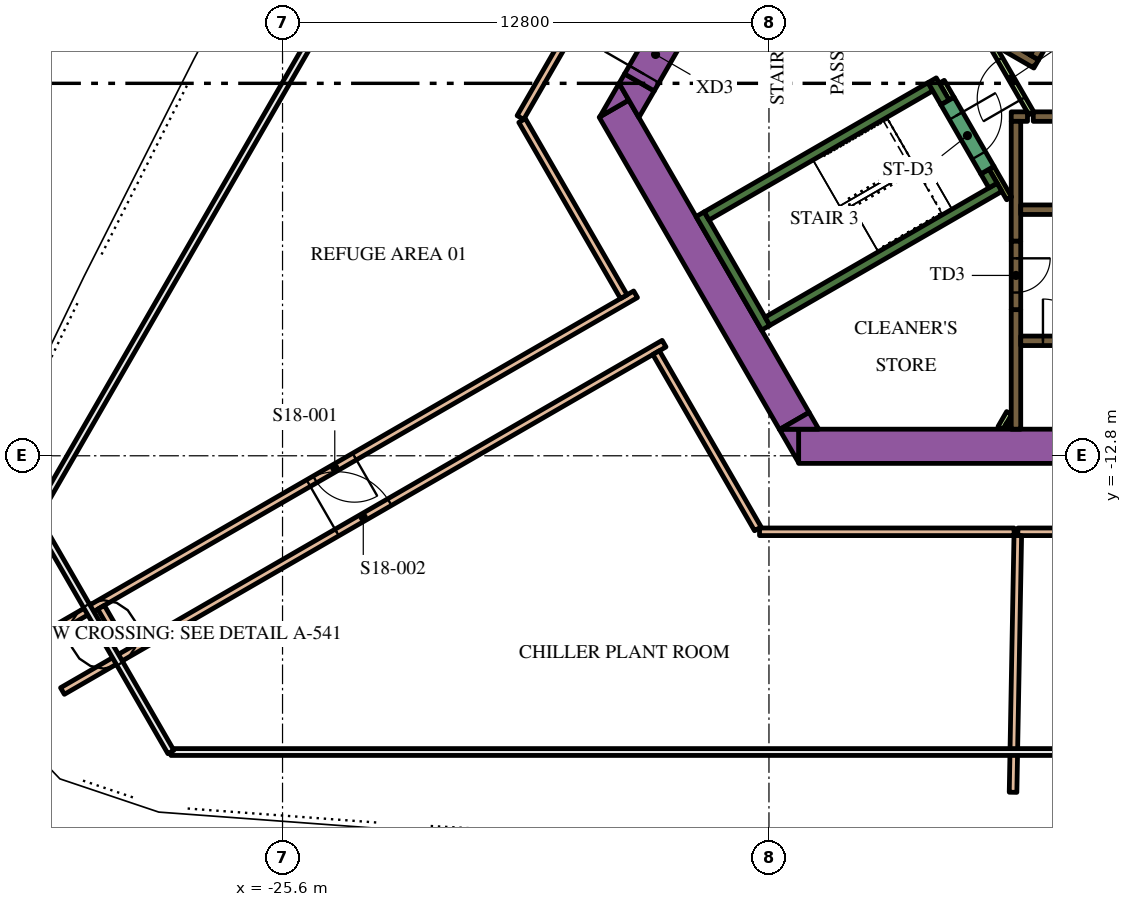
"""IFC4 building model, lengths in metres.
Left out: names, types, materials, properties, quantities, classifications, styles, units other than length and angle.
Written with IfcOpenShell. Run it as: python <this file> out.ifc"""

import sys

from ifc_helpers import new_model, si_unit, direction, frame, frame_2d, origin, place, context, subcontext, project, spatial, polyline, rectangle, outline, extrude, element, fill, save


model = new_model("IFC4")
c1 = context("Model", 3, precision=1e-05, world=origin(), true_north=direction((0.0, 1.0)))
c2 = subcontext(c1, "Body", "Model", "MODEL_VIEW")
j1 = project(units=[si_unit("LENGTHUNIT", "METRE"), si_unit("PLANEANGLEUNIT", "RADIAN")], contexts=[c1])
p1 = place(None, origin())
s1 = spatial("IfcSite", under=j1, at=p1, CompositionType="ELEMENT")
p2 = place(p1, origin())
s2 = spatial("IfcBuilding", under=s1, at=p2, CompositionType="ELEMENT")
p3 = place(p2, frame((0.0, 0.0, 78.3)))
s3 = spatial("IfcBuildingStorey", under=s2, at=p3, CompositionType="ELEMENT", Elevation=78.3)
p4 = place(p3, frame((-12.019, -12.55, 0.0), z_axis=(0.0, 0.0, 1.0), x_axis=(1.0, 0.0, 0.0)))
e1 = element("IfcWall", 1, at=p4, inside=s3, PredefinedType="SOLIDWALL", context=c2, shape_type="SweptSolid", body=[
    extrude(rectangle(XDim=21.63, YDim=0.9, at=frame_2d((10.815, 0.0))), origin(), (0.0, 0.0, 1.0), 5.4),
])
p5 = place(p3, origin())
e2 = element("IfcWall", 2, at=p5, inside=s3, PredefinedType="SOLIDWALL", context=c2, shape_type="SweptSolid", body=[
    extrude(outline(polyline([(-12.529, -12.1), (-12.021, -12.1), (-12.021, -12.98), (-12.529, -12.1)])), origin(), (0.0, 0.0, 1.0), 5.4),
])
p6 = place(p3, frame((-12.134, -11.883, 0.0), z_axis=(0.0, 0.0, 1.0), x_axis=(-0.500005339912, 0.866022320763, 0.0)))
e3 = element("IfcWall", 3, at=p6, inside=s3, PredefinedType="SOLIDWALL", context=c2, shape_type="SweptSolid", body=[
    extrude(rectangle(XDim=9.488, YDim=0.9, at=frame_2d((4.744, 0.0))), origin(), (0.0, 0.0, 1.0), 5.4),
])
e4 = element("IfcWall", 4, at=p5, inside=s3, PredefinedType="SOLIDWALL", context=c2, shape_type="SweptSolid", body=[
    extrude(outline(polyline([(-16.489, -3.44), (-17.251, -3.88), (-16.743, -3.0), (-16.489, -3.44)])), origin(), (0.0, 0.0, 1.0), 5.4),
])
e5 = element("IfcWall", 5, at=p5, inside=s3, PredefinedType="SOLIDWALL", context=c2, shape_type="SweptSolid", body=[
    extrude(outline(polyline([(-11.489, -12.1), (-12.505, -12.1), (-11.743, -11.66), (-11.489, -12.1)])), origin(), (0.0, 0.0, 1.0), 5.4),
])
e6 = element("IfcWall", 6, at=p5, inside=s3, PredefinedType="SOLIDWALL", context=c2, shape_type="SweptSolid", body=[
    extrude(outline(polyline([(-15.82, -3.201), (-16.223, -3.9), (-16.743, -3.0), (-16.599, -2.751), (-15.82, -3.201)])), origin(), (0.0, 0.0, 1.0), 5.4),
])
p7 = place(p3, frame((-12.885, -9.431, 0.0), z_axis=(0.0, 0.0, 1.0), x_axis=(-0.500020560727, 0.866013532718, 0.0)))
e7 = element("IfcWall", 7, at=p7, inside=s3, PredefinedType="SOLIDWALL", context=c2, shape_type="SweptSolid", body=[
    extrude(rectangle(XDim=3.45, YDim=0.25, at=frame_2d((1.725, 0.0))), origin(), (0.0, 0.0, 1.0), 5.4),
])
p8 = place(p3, frame((-14.44, -6.49, 0.0), z_axis=(0.0, 0.0, 1.0), x_axis=(0.866022966069, 0.500004222222, 0.0)))
e8 = element("IfcWall", 8, at=p8, inside=s3, PredefinedType="SOLIDWALL", context=c2, shape_type="SweptSolid", body=[
    extrude(rectangle(XDim=6.8, YDim=0.25, at=frame_2d((3.4, 0.0))), origin(), (0.0, 0.0, 1.0), 5.4),
])
p9 = place(p3, frame((-8.168, -3.503, 0.0), z_axis=(0.0, 0.0, 1.0), x_axis=(-0.499952099219, 0.866053057547, 0.0)))
e9 = element("IfcWall", 9, at=p9, inside=s3, PredefinedType="SOLIDWALL", context=c2, shape_type="SweptSolid", body=[
    extrude(rectangle(XDim=0.675, YDim=0.25, at=frame_2d((0.337, 0.0))), origin(), (0.0, 0.0, 1.0), 5.4),
])
p10 = place(p3, frame((-12.84, -9.261, 0.0), z_axis=(0.0, 0.0, 1.0), x_axis=(0.866016039709, 0.500016218704, 0.0)))
e10 = element("IfcWall", 10, at=p10, inside=s3, PredefinedType="SOLIDWALL", context=c2, shape_type="SweptSolid", body=[
    extrude(rectangle(XDim=7.05, YDim=0.25, at=frame_2d((3.525, 0.0))), origin(), (0.0, 0.0, 1.0), 5.4),
])
p11 = place(p3, frame((-6.905, -5.69, 0.0), z_axis=(0.0, 0.0, 1.0), x_axis=(-0.500402024738, 0.865793170242, 0.0)))
e11 = element("IfcWall", 11, at=p11, inside=s3, PredefinedType="SOLIDWALL", context=c2, shape_type="SweptSolid", body=[
    extrude(rectangle(XDim=0.425, YDim=0.25, at=frame_2d((0.212, 0.0))), origin(), (0.0, 0.0, 1.0), 5.4),
])
p12 = place(p3, frame((-6.3, -12.1, 0.0), z_axis=(0.0, 0.0, 1.0), x_axis=(0.0, 1.0, 0.0)))
e12 = element("IfcWall", 12, at=p12, inside=s3, PredefinedType="SOLIDWALL", context=c2, shape_type="SweptSolid", body=[
    extrude(rectangle(XDim=3.146, YDim=0.25, at=frame_2d((1.573, 0.0))), origin(), (0.0, 0.0, 1.0), 5.4),
])
p13 = place(p3, frame((-5.845, -3.875, 0.0), z_axis=(0.0, 0.0, 1.0), x_axis=(1.0, 0.0, 0.0)))
e13 = element("IfcWall", 13, at=p13, inside=s3, PredefinedType="SOLIDWALL", context=c2, shape_type="SweptSolid", body=[
    extrude(rectangle(XDim=12.27, YDim=0.25, at=frame_2d((6.135, 0.0))), origin(), (0.0, 0.0, 1.0), 5.4),
])
p14 = place(p3, frame((-6.425, -3.875, 0.0), z_axis=(0.0, 0.0, 1.0), x_axis=(1.0, 0.0, 0.0)))
e14 = element("IfcWall", 14, at=p14, inside=s3, PredefinedType="SOLIDWALL", context=c2, shape_type="SweptSolid", body=[
    extrude(rectangle(XDim=0.428, YDim=0.25, at=frame_2d((0.214, 0.0))), origin(), (0.0, 0.0, 1.0), 5.4),
])
p15 = place(p3, frame((-6.3, -4.0, 0.0), z_axis=(0.0, 0.0, 1.0), x_axis=(0.0, -1.0, 0.0)))
e15 = element("IfcWall", 15, at=p15, inside=s3, PredefinedType="SOLIDWALL", context=c2, shape_type="SweptSolid", body=[
    extrude(rectangle(XDim=3.154, YDim=0.25, at=frame_2d((1.577, 0.0))), origin(), (0.0, 0.0, 1.0), 5.4),
])
e16 = element("IfcWall", 16, at=p5, inside=s3, PredefinedType="SOLIDWALL", context=c2, shape_type="SweptSolid", body=[
    extrude(outline(polyline([(-5.922, -2.257), (-5.922, -2.257), (-5.705, -2.382), (-5.83, -2.598), (-6.829, -2.021), (-6.88, -1.934), (-6.88, -1.934), (-6.93, -1.963), (-7.952, -1.373), (-7.827, -1.156), (-5.922, -2.257)])), origin(), (0.0, 0.0, 1.0), 5.4),
])
p16 = place(p3, frame((-6.708, -12.068, 0.0), z_axis=(0.0, 0.0, 1.0), x_axis=(0.500000789788, 0.8660249478, 0.0)))
e17 = element("IfcWall", 17, at=p16, inside=s3, PredefinedType="PARTITIONING", context=c2, shape_type="SweptSolid", body=[
    extrude(rectangle(XDim=0.456, YDim=0.15, at=frame_2d((0.228, 0.0))), origin(), (0.0, 0.0, 1.0), 4.25),
])
p17 = place(p3, frame((-6.534, -12.068, 0.0), z_axis=(0.0, 0.0, 1.0), x_axis=(0.500240224089, 0.865886665912, 0.0)))
e18 = element("IfcWall", 18, at=p17, inside=s3, PredefinedType="PARTITIONING", context=c2, shape_type="SweptSolid", body=[
    extrude(rectangle(XDim=0.109, YDim=0.15, at=frame_2d((0.054, 0.0))), origin(), (0.0, 0.0, 1.0), 4.25),
])
p18 = place(p3, frame((-6.48, -6.027, 0.0), z_axis=(0.0, 0.0, 1.0), x_axis=(-0.499927229454, 0.866067413802, 0.0)))
e19 = element("IfcWall", 19, at=p18, inside=s3, PredefinedType="PARTITIONING", context=c2, shape_type="SweptSolid", body=[
    extrude(rectangle(XDim=0.929, YDim=0.15, at=frame_2d((0.464, 0.0))), origin(), (0.0, 0.0, 1.0), 5.4),
])
p19 = place(p3, frame((-8.252, -2.958, 0.0), z_axis=(0.0, 0.0, 1.0), x_axis=(0.500174715838, -0.865924508047, 0.0)))
e20 = element("IfcWall", 20, at=p19, inside=s3, PredefinedType="PARTITIONING", context=c2, shape_type="SweptSolid", body=[
    extrude(rectangle(XDim=0.514, YDim=0.15, at=frame_2d((0.257, 0.0))), origin(), (0.0, 0.0, 1.0), 4.25),
])
p20 = place(p3, frame((-6.175, -9.775, 0.0), z_axis=(0.0, 0.0, 1.0), x_axis=(1.0, 0.0, 0.0)))
e21 = element("IfcWall", 21, at=p20, inside=s3, PredefinedType="SOLIDWALL", context=c2, shape_type="SweptSolid", body=[
    extrude(rectangle(XDim=12.35, YDim=0.25, at=frame_2d((6.175, 0.0))), origin(), (0.0, 0.0, 1.0), 5.4),
])
p21 = place(p20, frame((0.585, 0.0, 0.0)))
e22 = element("IfcOpeningElement", 22, at=p21, cuts=e21, PredefinedType="OPENING", context=c2, shape_type="SweptSolid", body=[
    extrude(rectangle(XDim=1.1, YDim=2.1, at=frame_2d((0.55, 1.05))), frame((0.0, 0.135, 0.0), z_axis=(0.0, -1.0, 0.0), x_axis=(1.0, 0.0, 0.0)), (0.0, 0.0, 1.0), 0.27),
])
p22 = place(p20, frame((3.105, 0.0, 0.0)))
e23 = element("IfcOpeningElement", 23, at=p22, cuts=e21, PredefinedType="OPENING", context=c2, shape_type="SweptSolid", body=[
    extrude(rectangle(XDim=1.1, YDim=2.1, at=frame_2d((0.55, 1.05))), frame((0.0, 0.135, 0.0), z_axis=(0.0, -1.0, 0.0), x_axis=(1.0, 0.0, 0.0)), (0.0, 0.0, 1.0), 0.27),
])
p23 = place(p20, frame((5.625, 0.0, 0.0)))
e24 = element("IfcOpeningElement", 24, at=p23, cuts=e21, PredefinedType="OPENING", context=c2, shape_type="SweptSolid", body=[
    extrude(rectangle(XDim=1.1, YDim=2.1, at=frame_2d((0.55, 1.05))), frame((0.0, 0.135, 0.0), z_axis=(0.0, -1.0, 0.0), x_axis=(1.0, 0.0, 0.0)), (0.0, 0.0, 1.0), 0.27),
])
p24 = place(p20, frame((8.145, 0.0, 0.0)))
e25 = element("IfcOpeningElement", 25, at=p24, cuts=e21, PredefinedType="OPENING", context=c2, shape_type="SweptSolid", body=[
    extrude(rectangle(XDim=1.1, YDim=2.1, at=frame_2d((0.55, 1.05))), frame((0.0, 0.135, 0.0), z_axis=(0.0, -1.0, 0.0), x_axis=(1.0, 0.0, 0.0)), (0.0, 0.0, 1.0), 0.27),
])
p25 = place(p20, frame((10.665, 0.0, 0.0)))
e26 = element("IfcOpeningElement", 26, at=p25, cuts=e21, PredefinedType="OPENING", context=c2, shape_type="SweptSolid", body=[
    extrude(rectangle(XDim=1.1, YDim=2.1, at=frame_2d((0.55, 1.05))), frame((0.0, 0.135, 0.0), z_axis=(0.0, -1.0, 0.0), x_axis=(1.0, 0.0, 0.0)), (0.0, 0.0, 1.0), 0.27),
])
p26 = place(p3, frame((-6.175, -6.325, 0.0), z_axis=(0.0, 0.0, 1.0), x_axis=(1.0, 0.0, 0.0)))
e27 = element("IfcWall", 27, at=p26, inside=s3, PredefinedType="SOLIDWALL", context=c2, shape_type="SweptSolid", body=[
    extrude(rectangle(XDim=12.35, YDim=0.25, at=frame_2d((6.175, 0.0))), origin(), (0.0, 0.0, 1.0), 5.4),
])
p27 = place(p26, frame((3.205, 0.0, 0.0)))
e28 = element("IfcOpeningElement", 28, at=p27, cuts=e27, PredefinedType="OPENING", context=c2, shape_type="SweptSolid", body=[
    extrude(rectangle(XDim=0.9, YDim=2.1, at=frame_2d((0.45, 1.05))), frame((0.0, 0.135, 0.0), z_axis=(0.0, -1.0, 0.0), x_axis=(1.0, 0.0, 0.0)), (0.0, 0.0, 1.0), 0.27),
])
p28 = place(p26, frame((8.145, 0.0, 0.0)))
e29 = element("IfcOpeningElement", 29, at=p28, cuts=e27, PredefinedType="OPENING", context=c2, shape_type="SweptSolid", body=[
    extrude(rectangle(XDim=1.1, YDim=2.1, at=frame_2d((0.55, 1.05))), frame((0.0, 0.135, 0.0), z_axis=(0.0, -1.0, 0.0), x_axis=(1.0, 0.0, 0.0)), (0.0, 0.0, 1.0), 0.27),
])
p29 = place(p26, frame((10.665, 0.0, 0.0)))
e30 = element("IfcOpeningElement", 30, at=p29, cuts=e27, PredefinedType="OPENING", context=c2, shape_type="SweptSolid", body=[
    extrude(rectangle(XDim=1.1, YDim=2.1, at=frame_2d((0.55, 1.05))), frame((0.0, 0.135, 0.0), z_axis=(0.0, -1.0, 0.0), x_axis=(1.0, 0.0, 0.0)), (0.0, 0.0, 1.0), 0.27),
])
p30 = place(p3, frame((-0.898, 6.194, 0.0), z_axis=(0.0, 0.0, 1.0), x_axis=(-0.499996202215, -0.866027596426, 0.0)))
e31 = element("IfcWall", 31, at=p30, inside=s3, PredefinedType="SOLIDWALL", context=c2, shape_type="SweptSolid", body=[
    extrude(rectangle(XDim=9.83, YDim=0.25, at=frame_2d((4.915, 0.0))), origin(), (0.0, 0.0, 1.0), 5.4),
])
p31 = place(p30, frame((0.585, 0.0, 0.0)))
e32 = element("IfcOpeningElement", 32, at=p31, cuts=e31, PredefinedType="OPENING", context=c2, shape_type="SweptSolid", body=[
    extrude(rectangle(XDim=1.1, YDim=2.1, at=frame_2d((0.55, 1.05))), frame((0.0, 0.135, 0.0), z_axis=(0.0, -1.0, 0.0), x_axis=(1.0, 0.0, 0.0)), (0.0, 0.0, 1.0), 0.27),
])
p32 = place(p30, frame((3.105, 0.0, 0.0)))
e33 = element("IfcOpeningElement", 33, at=p32, cuts=e31, PredefinedType="OPENING", context=c2, shape_type="SweptSolid", body=[
    extrude(rectangle(XDim=1.1, YDim=2.1, at=frame_2d((0.55, 1.05))), frame((0.0, 0.135, 0.0), z_axis=(0.0, -1.0, 0.0), x_axis=(1.0, 0.0, 0.0)), (0.0, 0.0, 1.0), 0.27),
])
p33 = place(p30, frame((5.625, 0.0, 0.0)))
e34 = element("IfcOpeningElement", 34, at=p33, cuts=e31, PredefinedType="OPENING", context=c2, shape_type="SweptSolid", body=[
    extrude(rectangle(XDim=1.1, YDim=2.1, at=frame_2d((0.55, 1.05))), frame((0.0, 0.135, 0.0), z_axis=(0.0, -1.0, 0.0), x_axis=(1.0, 0.0, 0.0)), (0.0, 0.0, 1.0), 0.27),
])
p34 = place(p30, frame((8.145, 0.0, 0.0)))
e35 = element("IfcOpeningElement", 35, at=p34, cuts=e31, PredefinedType="OPENING", context=c2, shape_type="SweptSolid", body=[
    extrude(rectangle(XDim=1.1, YDim=2.1, at=frame_2d((0.55, 1.05))), frame((0.0, 0.135, 0.0), z_axis=(0.0, -1.0, 0.0), x_axis=(1.0, 0.0, 0.0)), (0.0, 0.0, 1.0), 0.27),
])
p35 = place(p3, frame((-8.103, -3.466, 0.0), z_axis=(0.0, 0.0, 1.0), x_axis=(0.500078061341, -0.865980330357, 0.0)))
e36 = element("IfcWall", 36, at=p35, inside=s3, PredefinedType="SOLIDWALL", context=c2, shape_type="SweptSolid", body=[
    extrude(rectangle(XDim=2.1, YDim=0.4, at=frame_2d((1.05, 0.0))), origin(), (0.0, 0.0, 1.0), 5.4),
])
p36 = place(p35, frame((0.45, 0.0, 0.0)))
e37 = element("IfcOpeningElement", 37, at=p36, cuts=e36, PredefinedType="OPENING", context=c2, shape_type="SweptSolid", body=[
    extrude(rectangle(XDim=1.2, YDim=2.1, at=frame_2d((0.6, 1.05))), frame((0.0, 0.21, 0.0), z_axis=(0.0, -1.0, 0.0), x_axis=(1.0, 0.0, 0.0)), (0.0, 0.0, 1.0), 0.42),
])
p37 = place(p3, frame((-6.3, -7.154, 0.0), z_axis=(0.0, 0.0, 1.0), x_axis=(0.0, -1.0, 0.0)))
e38 = element("IfcWall", 38, at=p37, inside=s3, PredefinedType="SOLIDWALL", context=c2, shape_type="SweptSolid", body=[
    extrude(rectangle(XDim=1.8, YDim=0.25, at=frame_2d((0.9, 0.0))), origin(), (0.0, 0.0, 1.0), 5.4),
])
p38 = place(p37, frame((0.45, 0.0, 0.0)))
e39 = element("IfcOpeningElement", 39, at=p38, cuts=e38, PredefinedType="OPENING", context=c2, shape_type="SweptSolid", body=[
    extrude(rectangle(XDim=0.9, YDim=2.1, at=frame_2d((0.45, 1.05))), frame((0.0, 0.135, 0.0), z_axis=(0.0, -1.0, 0.0), x_axis=(1.0, 0.0, 0.0)), (0.0, 0.0, 1.0), 0.27),
])
p39 = place(p3, frame((-5.895, -3.79, 0.0), z_axis=(0.0, 0.0, 1.0), x_axis=(-0.49994051562, 0.866059744384, 0.0)))
e40 = element("IfcWall", 40, at=p39, inside=s3, PredefinedType="PARTITIONING", context=c2, shape_type="SweptSolid", body=[
    extrude(rectangle(XDim=2.1, YDim=0.15, at=frame_2d((1.05, 0.0))), origin(), (0.0, 0.0, 1.0), 4.25),
])
p40 = place(p39, frame((0.45, 0.0, 0.0)))
e41 = element("IfcOpeningElement", 41, at=p40, cuts=e40, PredefinedType="OPENING", context=c2, shape_type="SweptSolid", body=[
    extrude(rectangle(XDim=1.2, YDim=2.1, at=frame_2d((0.6, 1.05))), frame((0.0, 0.085, 0.0), z_axis=(0.0, -1.0, 0.0), x_axis=(1.0, 0.0, 0.0)), (0.0, 0.0, 1.0), 0.17),
])
p41 = place(p3, frame((-16.209, -2.976, 0.0), z_axis=(0.0, 0.0, 1.0), x_axis=(0.499954529098, 0.86605165483, 0.0)))
e42 = element("IfcWall", 42, at=p41, inside=s3, PredefinedType="SOLIDWALL", context=c2, shape_type="SweptSolid", body=[
    extrude(rectangle(XDim=1.7, YDim=0.9, at=frame_2d((0.85, 0.0))), origin(), (0.0, 0.0, 1.0), 5.4),
])
p42 = place(p41, frame((0.25, 0.0, 0.0)))
e43 = element("IfcOpeningElement", 43, at=p42, cuts=e42, PredefinedType="OPENING", context=c2, shape_type="SweptSolid", body=[
    extrude(rectangle(XDim=1.2, YDim=2.1, at=frame_2d((0.6, 1.05))), frame((0.0, 0.46, 0.0), z_axis=(0.0, -1.0, 0.0), x_axis=(1.0, 0.0, 0.0)), (0.0, 0.0, 1.0), 0.92),
])
p43 = place(p3, frame((-31.391, -18.99, 0.0), z_axis=(0.0, 0.0, 1.0), x_axis=(0.866027012652, 0.49999721335, 0.0)))
e44 = element("IfcWall", 44, at=p43, inside=s3, PredefinedType="PARTITIONING", context=c2, shape_type="SweptSolid", body=[
    extrude(rectangle(XDim=18.28, YDim=0.2, at=frame_2d((9.14, 0.0))), origin(), (0.0, 0.0, 1.0), 4.25),
])
p44 = place(p43, frame((8.34, 0.0, 0.0)))
e45 = element("IfcOpeningElement", 45, at=p44, cuts=e44, PredefinedType="OPENING", context=c2, shape_type="SweptSolid", body=[
    extrude(rectangle(XDim=1.6, YDim=2.1, at=frame_2d((0.8, 1.05))), frame((0.0, 0.11, 0.0), z_axis=(0.0, -1.0, 0.0), x_axis=(1.0, 0.0, 0.0)), (0.0, 0.0, 1.0), 0.22),
])
p45 = place(p3, frame((-16.31, -8.551, 0.0), z_axis=(0.0, 0.0, 1.0), x_axis=(-0.866027012652, -0.49999721335, 0.0)))
e46 = element("IfcWall", 46, at=p45, inside=s3, PredefinedType="PARTITIONING", context=c2, shape_type="SweptSolid", body=[
    extrude(rectangle(XDim=18.28, YDim=0.2, at=frame_2d((9.14, 0.0))), origin(), (0.0, 0.0, 1.0), 4.25),
])
p46 = place(p45, frame((8.54, 0.0, 0.0)))
e47 = element("IfcOpeningElement", 47, at=p46, cuts=e46, PredefinedType="OPENING", context=c2, shape_type="SweptSolid", body=[
    extrude(rectangle(XDim=1.2, YDim=2.1, at=frame_2d((0.6, 1.05))), frame((0.0, 0.11, 0.0), z_axis=(0.0, -1.0, 0.0), x_axis=(1.0, 0.0, 0.0)), (0.0, 0.0, 1.0), 0.22),
])
p47 = place(p3, frame((-6.25, -14.8, 0.0), z_axis=(0.0, 0.0, 1.0), x_axis=(1.0, 0.0, 0.0)))
e48 = element("IfcWall", 48, at=p47, inside=s3, PredefinedType="PARTITIONING", context=c2, shape_type="SweptSolid", body=[
    extrude(rectangle(XDim=12.501, YDim=0.2, at=frame_2d((6.25, 0.0))), origin(), (0.0, 0.0, 1.0), 4.25),
])
p48 = place(p47, frame((5.451, 0.0, 0.0)))
e49 = element("IfcOpeningElement", 49, at=p48, cuts=e48, PredefinedType="OPENING", context=c2, shape_type="SweptSolid", body=[
    extrude(rectangle(XDim=1.6, YDim=2.1, at=frame_2d((0.8, 1.05))), frame((0.0, 0.11, 0.0), z_axis=(0.0, -1.0, 0.0), x_axis=(1.0, 0.0, 0.0)), (0.0, 0.0, 1.0), 0.22),
])
p49 = place(p3, frame((-6.252, -14.9, 0.0), z_axis=(0.0, 0.0, 1.0), x_axis=(-0.018503301714, -0.999828799258, 0.0)))
e50 = element("IfcWall", 50, at=p49, inside=s3, PredefinedType="PARTITIONING", context=c2, shape_type="SweptSolid", body=[
    extrude(rectangle(XDim=6.756, YDim=0.2, at=frame_2d((3.378, 0.0))), origin(), (0.0, 0.0, 1.0), 4.25),
])
p50 = place(p3, frame((-6.35, -14.8, 0.0), z_axis=(0.0, 0.0, 1.0), x_axis=(-1.0, 0.0, 0.0)))
e51 = element("IfcWall", 51, at=p50, inside=s3, PredefinedType="PARTITIONING", context=c2, shape_type="SweptSolid", body=[
    extrude(rectangle(XDim=6.698, YDim=0.2, at=frame_2d((3.349, 0.0))), origin(), (0.0, 0.0, 1.0), 4.25),
])
p51 = place(p3, frame((-19.341, -3.9, 0.0), z_axis=(0.0, 0.0, 1.0), x_axis=(0.500035875758, 0.866004689915, 0.0)))
e52 = element("IfcWall", 52, at=p51, inside=s3, PredefinedType="PARTITIONING", context=c2, shape_type="SweptSolid", body=[
    extrude(rectangle(XDim=6.698, YDim=0.2, at=frame_2d((3.349, 0.0))), origin(), (0.0, 0.0, 1.0), 4.25),
])
for number, where, z_axis, x_axis in (
    (53, (-16.62, -8.614, 0.0), (0.0, 0.0, 1.0), (-0.5, 0.866, 0.0)),
    (54, (-13.093, -14.722, 0.0), (0.0, 0.0, 1.0), (-0.5, 0.866, 0.0)),
):
    element("IfcWall", number, at=place(p3, frame(where, z_axis=z_axis, x_axis=x_axis)), inside=s3, PredefinedType="PARTITIONING", context=c2, shape_type="SweptSolid", body=[
        extrude(rectangle(XDim=5.353, YDim=0.2, at=frame_2d((2.677, 0.0))), origin(), (0.0, 0.0, 1.0), 4.25),
    ])
p52 = place(p3, frame((-30.118, -17.232, 0.0), z_axis=(0.0, 0.0, 1.0), x_axis=(-0.500325048718, 0.865837655467, 0.0)))
e55 = element("IfcWall", 55, at=p52, inside=s3, PredefinedType="PARTITIONING", context=c2, shape_type="SweptSolid", body=[
    extrude(rectangle(XDim=0.514, YDim=0.2, at=frame_2d((0.257, 0.0))), origin(), (0.0, 0.0, 1.0), 4.25),
])
p53 = place(p21, origin())
e56 = element("IfcDoor", 56, at=p53, inside=s3, OperationType="DOUBLE_DOOR_SLIDING", PredefinedType="DOOR", context=c2, shape_type="SweptSolid", body=[
    extrude(rectangle(XDim=1.1, YDim=2.1, at=frame_2d((0.55, 1.05))), frame((0.0, 0.025, 0.0), z_axis=(0.0, -1.0, 0.0), x_axis=(1.0, 0.0, 0.0)), (0.0, 0.0, 1.0), 0.05),
])
fill(e22, e56)
p54 = place(p36, origin())
e57 = element("IfcDoor", 57, at=p54, inside=s3, OperationType="SINGLE_SWING_LEFT", PredefinedType="DOOR", context=c2, shape_type="SweptSolid", body=[
    extrude(rectangle(XDim=1.2, YDim=2.1, at=frame_2d((0.6, 1.05))), frame((0.0, 0.025, 0.0), z_axis=(0.0, -1.0, 0.0), x_axis=(1.0, 0.0, 0.0)), (0.0, 0.0, 1.0), 0.05),
])
fill(e37, e57)
p55 = place(p38, origin())
e58 = element("IfcDoor", 58, at=p55, inside=s3, OperationType="SINGLE_SWING_LEFT", PredefinedType="DOOR", context=c2, shape_type="SweptSolid", body=[
    extrude(rectangle(XDim=0.9, YDim=2.1, at=frame_2d((0.45, 1.05))), frame((0.0, 0.025, 0.0), z_axis=(0.0, -1.0, 0.0), x_axis=(1.0, 0.0, 0.0)), (0.0, 0.0, 1.0), 0.05),
])
fill(e39, e58)
p56 = place(p40, origin())
e59 = element("IfcDoor", 59, at=p56, inside=s3, OperationType="SINGLE_SWING_LEFT", PredefinedType="DOOR", context=c2, shape_type="SweptSolid", body=[
    extrude(rectangle(XDim=1.2, YDim=2.1, at=frame_2d((0.6, 1.05))), frame((0.0, 0.025, 0.0), z_axis=(0.0, -1.0, 0.0), x_axis=(1.0, 0.0, 0.0)), (0.0, 0.0, 1.0), 0.05),
])
fill(e41, e59)
p57 = place(p42, origin())
e60 = element("IfcDoor", 60, at=p57, inside=s3, OperationType="SINGLE_SWING_LEFT", PredefinedType="DOOR", context=c2, shape_type="SweptSolid", body=[
    extrude(rectangle(XDim=1.2, YDim=2.1, at=frame_2d((0.6, 1.05))), frame((0.0, 0.025, 0.0), z_axis=(0.0, -1.0, 0.0), x_axis=(1.0, 0.0, 0.0)), (0.0, 0.0, 1.0), 0.05),
])
fill(e43, e60)
p58 = place(p46, origin())
e61 = element("IfcDoor", 61, at=p58, inside=s3, OperationType="SINGLE_SWING_RIGHT", PredefinedType="DOOR", context=c2, shape_type="SweptSolid", body=[
    extrude(rectangle(XDim=1.2, YDim=2.1, at=frame_2d((0.6, 1.05))), frame((0.0, 0.025, 0.0), z_axis=(0.0, -1.0, 0.0), x_axis=(1.0, 0.0, 0.0)), (0.0, 0.0, 1.0), 0.05),
])
fill(e47, e61)
p59 = place(p44, origin())
e62 = element("IfcDoor", 62, at=p59, inside=s3, OperationType="DOUBLE_DOOR_SINGLE_SWING", PredefinedType="DOOR", context=c2, shape_type="SweptSolid", body=[
    extrude(rectangle(XDim=1.6, YDim=2.1, at=frame_2d((0.8, 1.05))), frame((0.0, 0.025, 0.0), z_axis=(0.0, -1.0, 0.0), x_axis=(1.0, 0.0, 0.0)), (0.0, 0.0, 1.0), 0.05),
])
fill(e45, e62)
save(model, sys.argv[1])
